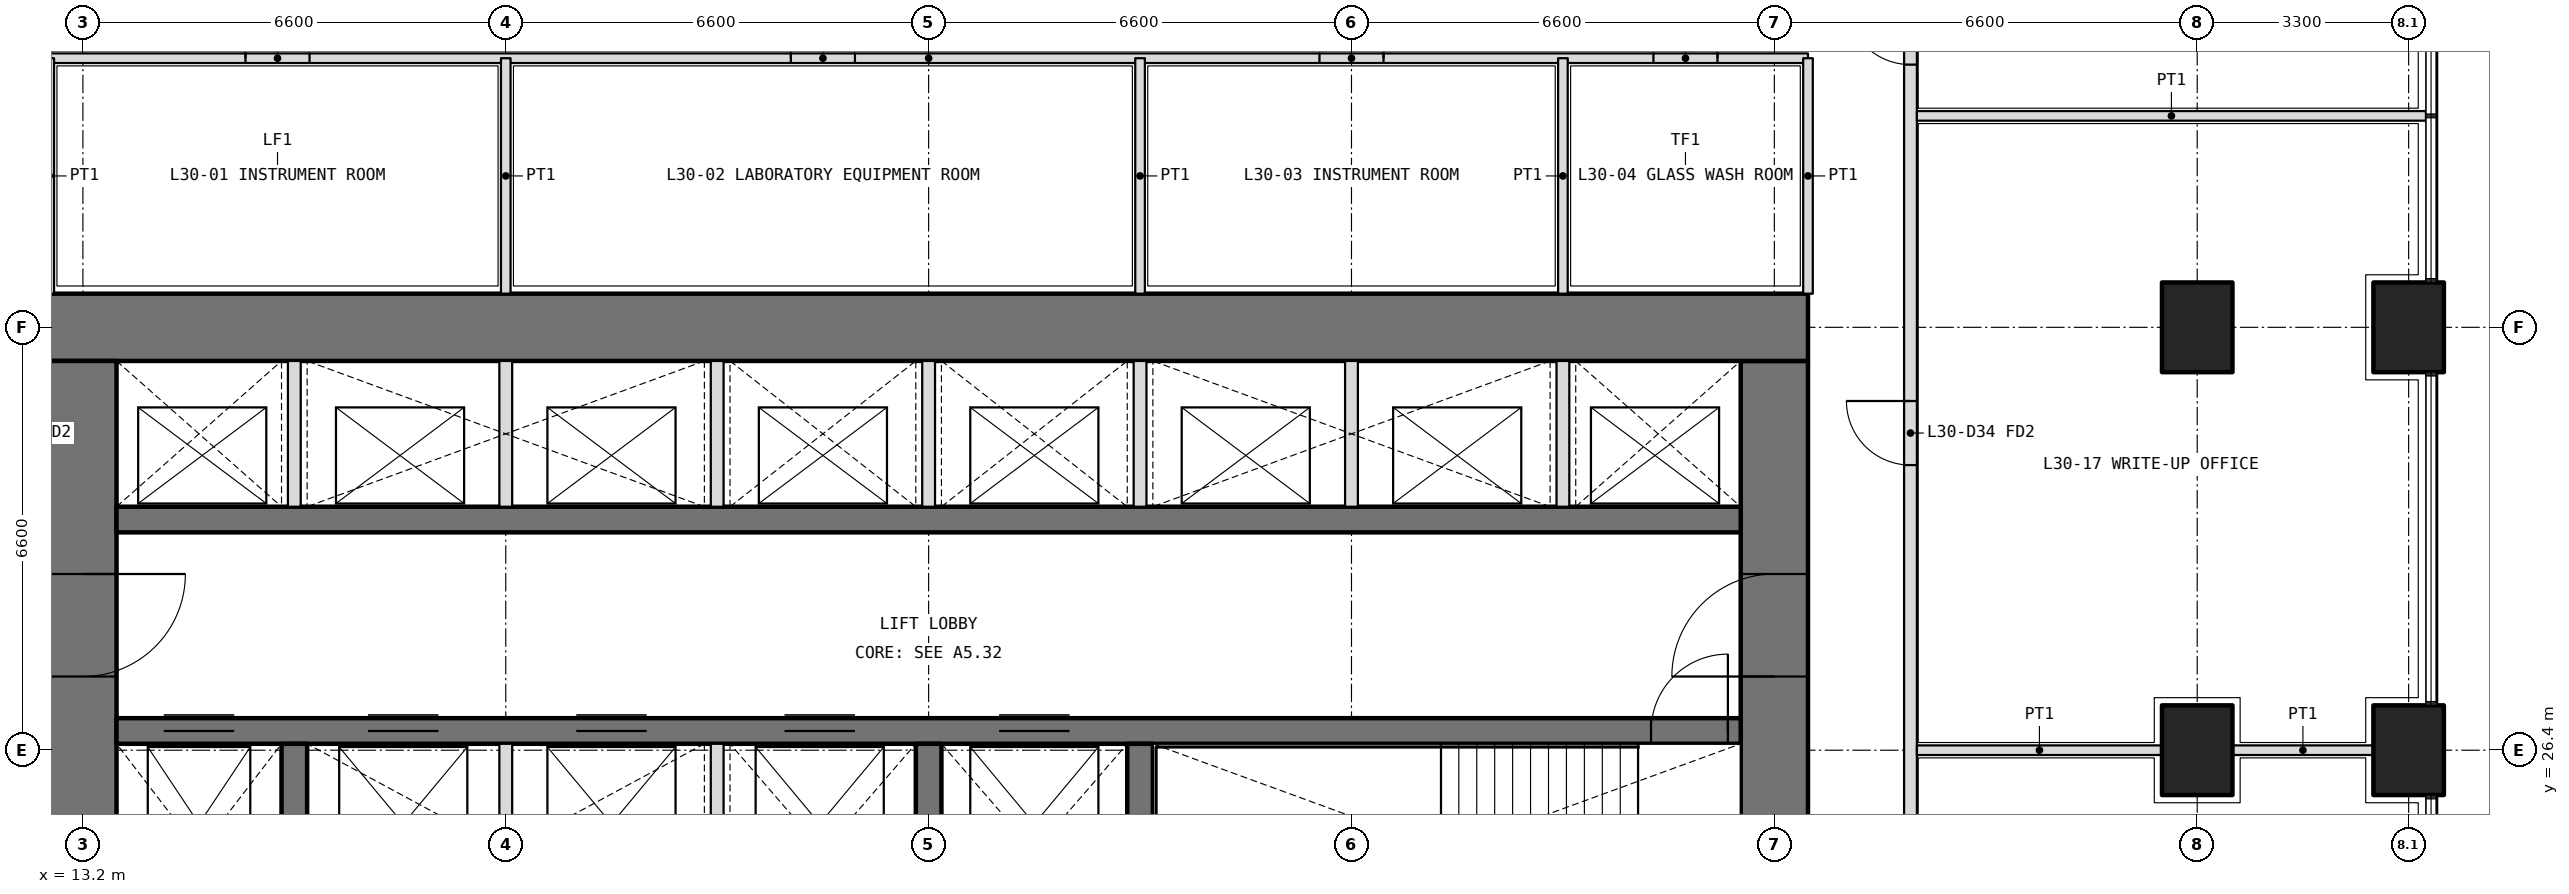
"""IFC4 building model, lengths in metres.
Left out: names, types, materials, properties, quantities, classifications, styles, units other than length and angle.
Written with IfcOpenShell. Run it as: python <this file> out.ifc"""

import sys

from ifc_helpers import new_model, si_unit, direction, frame, frame_2d, origin, origin_2d, place, context, subcontext, project, spatial, rectangle, extrude, element, fill, save


model = new_model("IFC4")
c1 = context("Model", 3, precision=1e-05, world=origin(), true_north=direction((0.0, 1.0)))
c2 = subcontext(c1, "Body", "Model", "MODEL_VIEW")
j1 = project(units=[si_unit("LENGTHUNIT", "METRE"), si_unit("PLANEANGLEUNIT", "RADIAN")], contexts=[c1])
p1 = place(None, origin())
s1 = spatial("IfcSite", under=j1, at=p1, CompositionType="ELEMENT")
p2 = place(p1, origin())
s2 = spatial("IfcBuilding", under=s1, at=p2, CompositionType="ELEMENT")
p3 = place(p2, frame((0.0, 0.0, 132.6)))
s3 = spatial("IfcBuildingStorey", under=s2, at=p3, CompositionType="ELEMENT", Elevation=132.6)
for number, where, z_axis, x_axis in (
    (1, (49.5, 26.4, 0.0), (0.0, 0.0, 1.0), (0.0, 1.0, 0.0)),
    (2, (49.5, 33.0, 0.0), (0.0, 0.0, 1.0), (0.0, 1.0, 0.0)),
    (3, (46.2, 26.4, 0.0), (0.0, 0.0, 1.0), (0.0, 1.0, 0.0)),
    (4, (46.2, 33.0, 0.0), (0.0, 0.0, 1.0), (0.0, 1.0, 0.0)),
):
    element("IfcColumn", number, at=place(p3, frame(where, z_axis=z_axis, x_axis=x_axis)), inside=s3, PredefinedType="COLUMN", context=c2, shape_type="SweptSolid", body=[
        extrude(rectangle(XDim=1.4, YDim=1.1, at=origin_2d()), origin(), (0.0, 0.0, 1.0), 4.2),
    ])
p4 = place(p3, frame((39.6, 13.725, 0.0), z_axis=(0.0, 0.0, 1.0), x_axis=(0.0, 1.0, 0.0)))
e5 = element("IfcWall", 5, at=p4, inside=s3, PredefinedType="SHEAR", context=c2, shape_type="SweptSolid", body=[
    extrude(rectangle(XDim=18.75, YDim=1.05, at=frame_2d((9.375, 0.0))), origin(), (0.0, 0.0, 1.0), 4.2),
])
p5 = place(p4, frame((3.025, 0.0, 0.0)))
e6 = element("IfcOpeningElement", 6, at=p5, cuts=e5, PredefinedType="OPENING", context=c2, shape_type="SweptSolid", body=[
    extrude(rectangle(XDim=1.6, YDim=2.1, at=frame_2d((0.8, 1.05))), frame((0.0, 0.535, 0.0), z_axis=(0.0, -1.0, 0.0), x_axis=(1.0, 0.0, 0.0)), (0.0, 0.0, 1.0), 1.07),
])
p6 = place(p4, frame((13.825, 0.0, 0.0)))
e7 = element("IfcOpeningElement", 7, at=p6, cuts=e5, PredefinedType="OPENING", context=c2, shape_type="SweptSolid", body=[
    extrude(rectangle(XDim=1.6, YDim=2.1, at=frame_2d((0.8, 1.05))), frame((0.0, 0.535, 0.0), z_axis=(0.0, -1.0, 0.0), x_axis=(1.0, 0.0, 0.0)), (0.0, 0.0, 1.0), 1.07),
])
p7 = place(p3, frame((40.125, 33.0, 0.0), z_axis=(0.0, 0.0, 1.0), x_axis=(-1.0, 0.0, 0.0)))
e8 = element("IfcWall", 8, at=p7, inside=s3, PredefinedType="SHEAR", context=c2, shape_type="SweptSolid", body=[
    extrude(rectangle(XDim=27.45, YDim=1.05, at=frame_2d((13.725, 0.0))), origin(), (0.0, 0.0, 1.0), 4.2),
])
p8 = place(p3, frame((13.2, 32.475, 0.0), z_axis=(0.0, 0.0, 1.0), x_axis=(0.0, -1.0, 0.0)))
e9 = element("IfcWall", 9, at=p8, inside=s3, PredefinedType="SHEAR", context=c2, shape_type="SweptSolid", body=[
    extrude(rectangle(XDim=18.75, YDim=1.05, at=frame_2d((9.375, 0.0))), origin(), (0.0, 0.0, 1.0), 4.2),
])
p9 = place(p8, frame((14.125, 0.0, 0.0)))
e10 = element("IfcOpeningElement", 10, at=p9, cuts=e9, PredefinedType="OPENING", context=c2, shape_type="SweptSolid", body=[
    extrude(rectangle(XDim=1.6, YDim=2.1, at=frame_2d((0.8, 1.05))), frame((0.0, 0.535, 0.0), z_axis=(0.0, -1.0, 0.0), x_axis=(1.0, 0.0, 0.0)), (0.0, 0.0, 1.0), 1.07),
])
p10 = place(p8, frame((3.325, 0.0, 0.0)))
e11 = element("IfcOpeningElement", 11, at=p10, cuts=e9, PredefinedType="OPENING", context=c2, shape_type="SweptSolid", body=[
    extrude(rectangle(XDim=1.6, YDim=2.1, at=frame_2d((0.8, 1.05))), frame((0.0, 0.535, 0.0), z_axis=(0.0, -1.0, 0.0), x_axis=(1.0, 0.0, 0.0)), (0.0, 0.0, 1.0), 1.07),
])
p11 = place(p3, frame((13.725, 26.7, 0.0), z_axis=(0.0, 0.0, 1.0), x_axis=(1.0, 0.0, 0.0)))
e12 = element("IfcWall", 12, at=p11, inside=s3, PredefinedType="SHEAR", context=c2, shape_type="SweptSolid", body=[
    extrude(rectangle(XDim=25.35, YDim=0.4, at=frame_2d((12.675, 0.0))), origin(), (0.0, 0.0, 1.0), 4.2),
])
p12 = place(p11, frame((23.95, 0.0, 0.0)))
e13 = element("IfcOpeningElement", 13, at=p12, cuts=e12, PredefinedType="OPENING", context=c2, shape_type="SweptSolid", body=[
    extrude(rectangle(XDim=1.2, YDim=2.1, at=frame_2d((0.6, 1.05))), frame((0.0, 0.21, 0.0), z_axis=(0.0, -1.0, 0.0), x_axis=(1.0, 0.0, 0.0)), (0.0, 0.0, 1.0), 0.42),
])
p13 = place(p11, frame((0.738, 0.0, 0.0)))
e14 = element("IfcOpeningElement", 14, at=p13, cuts=e12, PredefinedType="OPENING", context=c2, shape_type="SweptSolid", body=[
    extrude(rectangle(XDim=1.1, YDim=2.1, at=frame_2d((0.55, 1.05))), frame((0.0, 0.21, 0.0), z_axis=(0.0, -1.0, 0.0), x_axis=(1.0, 0.0, 0.0)), (0.0, 0.0, 1.0), 0.42),
])
p14 = place(p11, frame((3.925, 0.0, 0.0)))
e15 = element("IfcOpeningElement", 15, at=p14, cuts=e12, PredefinedType="OPENING", context=c2, shape_type="SweptSolid", body=[
    extrude(rectangle(XDim=1.1, YDim=2.1, at=frame_2d((0.55, 1.05))), frame((0.0, 0.21, 0.0), z_axis=(0.0, -1.0, 0.0), x_axis=(1.0, 0.0, 0.0)), (0.0, 0.0, 1.0), 0.42),
])
p15 = place(p11, frame((7.175, 0.0, 0.0)))
e16 = element("IfcOpeningElement", 16, at=p15, cuts=e12, PredefinedType="OPENING", context=c2, shape_type="SweptSolid", body=[
    extrude(rectangle(XDim=1.1, YDim=2.1, at=frame_2d((0.55, 1.05))), frame((0.0, 0.21, 0.0), z_axis=(0.0, -1.0, 0.0), x_axis=(1.0, 0.0, 0.0)), (0.0, 0.0, 1.0), 0.42),
])
p16 = place(p11, frame((10.425, 0.0, 0.0)))
e17 = element("IfcOpeningElement", 17, at=p16, cuts=e12, PredefinedType="OPENING", context=c2, shape_type="SweptSolid", body=[
    extrude(rectangle(XDim=1.1, YDim=2.1, at=frame_2d((0.55, 1.05))), frame((0.0, 0.21, 0.0), z_axis=(0.0, -1.0, 0.0), x_axis=(1.0, 0.0, 0.0)), (0.0, 0.0, 1.0), 0.42),
])
p17 = place(p11, frame((13.775, 0.0, 0.0)))
e18 = element("IfcOpeningElement", 18, at=p17, cuts=e12, PredefinedType="OPENING", context=c2, shape_type="SweptSolid", body=[
    extrude(rectangle(XDim=1.1, YDim=2.1, at=frame_2d((0.55, 1.05))), frame((0.0, 0.21, 0.0), z_axis=(0.0, -1.0, 0.0), x_axis=(1.0, 0.0, 0.0)), (0.0, 0.0, 1.0), 0.42),
])
p18 = place(p3, frame((13.725, 30.0, 0.0), z_axis=(0.0, 0.0, 1.0), x_axis=(1.0, 0.0, 0.0)))
e19 = element("IfcWall", 19, at=p18, inside=s3, PredefinedType="SHEAR", context=c2, shape_type="SweptSolid", body=[
    extrude(rectangle(XDim=25.35, YDim=0.4, at=frame_2d((12.675, 0.0))), origin(), (0.0, 0.0, 1.0), 4.2),
])
for number, where, z_axis, x_axis in (
    (20, (16.5, 23.15, 0.0), (0.0, 0.0, 1.0), (0.0, 1.0, 0.0)),
    (21, (26.4, 23.15, 0.0), (0.0, 0.0, 1.0), (0.0, 1.0, 0.0)),
    (22, (29.7, 23.15, 0.0), (0.0, 0.0, 1.0), (0.0, 1.0, 0.0)),
):
    element("IfcWall", number, at=place(p3, frame(where, z_axis=z_axis, x_axis=x_axis)), inside=s3, PredefinedType="SHEAR", context=c2, shape_type="SweptSolid", body=[
        extrude(rectangle(XDim=3.35, YDim=0.4, at=frame_2d((1.675, 0.0))), origin(), (0.0, 0.0, 1.0), 4.2),
    ])
for number, where, z_axis, x_axis in (
    (23, (16.5, 30.2, 0.0), (0.0, 0.0, 1.0), (0.0, 1.0, 0.0)),
    (24, (19.8, 30.2, 0.0), (0.0, 0.0, 1.0), (0.0, 1.0, 0.0)),
    (25, (23.1, 30.2, 0.0), (0.0, 0.0, 1.0), (0.0, 1.0, 0.0)),
    (26, (26.4, 30.2, 0.0), (0.0, 0.0, 1.0), (0.0, 1.0, 0.0)),
    (27, (29.7, 30.2, 0.0), (0.0, 0.0, 1.0), (0.0, 1.0, 0.0)),
    (28, (33.0, 30.2, 0.0), (0.0, 0.0, 1.0), (0.0, 1.0, 0.0)),
    (29, (36.3, 30.2, 0.0), (0.0, 0.0, 1.0), (0.0, 1.0, 0.0)),
):
    element("IfcWall", number, at=place(p3, frame(where, z_axis=z_axis, x_axis=x_axis)), inside=s3, PredefinedType="PARTITIONING", context=c2, shape_type="SweptSolid", body=[
        extrude(rectangle(XDim=2.275, YDim=0.2, at=frame_2d((1.138, 0.0))), origin(), (0.0, 0.0, 1.0), 4.2),
    ])
for number, where, z_axis, x_axis in (
    (30, (19.8, 23.15, 0.0), (0.0, 0.0, 1.0), (0.0, 1.0, 0.0)),
    (31, (23.1, 23.15, 0.0), (0.0, 0.0, 1.0), (0.0, 1.0, 0.0)),
):
    element("IfcWall", number, at=place(p3, frame(where, z_axis=z_axis, x_axis=x_axis)), inside=s3, PredefinedType="PARTITIONING", context=c2, shape_type="SweptSolid", body=[
        extrude(rectangle(XDim=3.35, YDim=0.2, at=frame_2d((1.675, 0.0))), origin(), (0.0, 0.0, 1.0), 4.2),
    ])
p19 = place(p3, frame((12.675, 37.2, 0.0), z_axis=(0.0, 0.0, 1.0), x_axis=(1.0, 0.0, 0.0)))
e32 = element("IfcWall", 32, at=p19, inside=s3, PredefinedType="PARTITIONING", context=c2, shape_type="SweptSolid", body=[
    extrude(rectangle(XDim=27.45, YDim=0.15, at=frame_2d((13.725, 0.0))), origin(), (0.0, 0.0, 1.0), 2.85),
])
p20 = place(p19, frame((3.062, 0.0, 0.0)))
e33 = element("IfcOpeningElement", 33, at=p20, cuts=e32, PredefinedType="OPENING", context=c2, shape_type="SweptSolid", body=[
    extrude(rectangle(XDim=1.0, YDim=2.1, at=frame_2d((0.5, 1.05))), frame((0.0, 0.085, 0.0), z_axis=(0.0, -1.0, 0.0), x_axis=(1.0, 0.0, 0.0)), (0.0, 0.0, 1.0), 0.17),
])
p21 = place(p19, frame((11.575, 0.0, 0.0)))
e34 = element("IfcOpeningElement", 34, at=p21, cuts=e32, PredefinedType="OPENING", context=c2, shape_type="SweptSolid", body=[
    extrude(rectangle(XDim=1.0, YDim=2.1, at=frame_2d((0.5, 1.05))), frame((0.0, 0.085, 0.0), z_axis=(0.0, -1.0, 0.0), x_axis=(1.0, 0.0, 0.0)), (0.0, 0.0, 1.0), 0.17),
])
p22 = place(p19, frame((19.825, 0.0, 0.0)))
e35 = element("IfcOpeningElement", 35, at=p22, cuts=e32, PredefinedType="OPENING", context=c2, shape_type="SweptSolid", body=[
    extrude(rectangle(XDim=1.0, YDim=2.1, at=frame_2d((0.5, 1.05))), frame((0.0, 0.085, 0.0), z_axis=(0.0, -1.0, 0.0), x_axis=(1.0, 0.0, 0.0)), (0.0, 0.0, 1.0), 0.17),
])
p23 = place(p19, frame((25.038, 0.0, 0.0)))
e36 = element("IfcOpeningElement", 36, at=p23, cuts=e32, PredefinedType="OPENING", context=c2, shape_type="SweptSolid", body=[
    extrude(rectangle(XDim=1.0, YDim=2.1, at=frame_2d((0.5, 1.05))), frame((0.0, 0.085, 0.0), z_axis=(0.0, -1.0, 0.0), x_axis=(1.0, 0.0, 0.0)), (0.0, 0.0, 1.0), 0.17),
])
for number, where, z_axis, x_axis in (
    (37, (12.675, 33.525, 0.0), (0.0, 0.0, 1.0), (0.0, 1.0, 0.0)),
    (38, (40.125, 33.525, 0.0), (0.0, 0.0, 1.0), (0.0, 1.0, 0.0)),
    (39, (19.8, 33.525, 0.0), (0.0, 0.0, 1.0), (0.0, 1.0, 0.0)),
):
    element("IfcWall", number, at=place(p3, frame(where, z_axis=z_axis, x_axis=x_axis)), inside=s3, PredefinedType="PARTITIONING", context=c2, shape_type="SweptSolid", body=[
        extrude(rectangle(XDim=3.675, YDim=0.15, at=frame_2d((1.837, 0.0))), origin(), (0.0, 0.0, 1.0), 2.85),
    ])
for number, where, z_axis, x_axis in (
    (40, (29.7, 33.525, 0.0), (0.0, 0.0, 1.0), (0.0, 1.0, 0.0)),
    (41, (36.3, 33.525, 0.0), (0.0, 0.0, 1.0), (0.0, 1.0, 0.0)),
):
    element("IfcWall", number, at=place(p3, frame(where, z_axis=z_axis, x_axis=x_axis)), inside=s3, PredefinedType="PARTITIONING", context=c2, shape_type="SweptSolid", body=[
        extrude(rectangle(XDim=3.675, YDim=0.15, at=frame_2d((1.837, 0.0))), origin(), (0.0, 0.0, 1.0), 3.9),
    ])
p24 = place(p3, frame((41.725, 11.175, 0.0), z_axis=(0.0, 0.0, 1.0), x_axis=(0.0, 1.0, 0.0)))
e42 = element("IfcWall", 42, at=p24, inside=s3, PredefinedType="PARTITIONING", context=c2, shape_type="SweptSolid", body=[
    extrude(rectangle(XDim=27.625, YDim=0.2, at=frame_2d((13.812, 0.0))), origin(), (0.0, 0.0, 1.0), 2.85),
])
p25 = place(p24, frame((3.762, 0.0, 0.0)))
e43 = element("IfcOpeningElement", 43, at=p25, cuts=e42, PredefinedType="OPENING", context=c2, shape_type="SweptSolid", body=[
    extrude(rectangle(XDim=1.0, YDim=2.1, at=frame_2d((0.5, 1.05))), frame((0.0, 0.11, 0.0), z_axis=(0.0, -1.0, 0.0), x_axis=(1.0, 0.0, 0.0)), (0.0, 0.0, 1.0), 0.22),
])
p26 = place(p24, frame((9.625, 0.0, 0.0)))
e44 = element("IfcOpeningElement", 44, at=p26, cuts=e42, PredefinedType="OPENING", context=c2, shape_type="SweptSolid", body=[
    extrude(rectangle(XDim=1.0, YDim=2.1, at=frame_2d((0.5, 1.05))), frame((0.0, 0.11, 0.0), z_axis=(0.0, -1.0, 0.0), x_axis=(1.0, 0.0, 0.0)), (0.0, 0.0, 1.0), 0.22),
])
p27 = place(p24, frame((12.975, 0.0, 0.0)))
e45 = element("IfcOpeningElement", 45, at=p27, cuts=e42, PredefinedType="OPENING", context=c2, shape_type="SweptSolid", body=[
    extrude(rectangle(XDim=0.9, YDim=2.1, at=frame_2d((0.45, 1.05))), frame((0.0, 0.11, 0.0), z_axis=(0.0, -1.0, 0.0), x_axis=(1.0, 0.0, 0.0)), (0.0, 0.0, 1.0), 0.22),
])
p28 = place(p24, frame((19.675, 0.0, 0.0)))
e46 = element("IfcOpeningElement", 46, at=p28, cuts=e42, PredefinedType="OPENING", context=c2, shape_type="SweptSolid", body=[
    extrude(rectangle(XDim=1.0, YDim=2.1, at=frame_2d((0.5, 1.05))), frame((0.0, 0.11, 0.0), z_axis=(0.0, -1.0, 0.0), x_axis=(1.0, 0.0, 0.0)), (0.0, 0.0, 1.0), 0.22),
])
p29 = place(p24, frame((25.925, 0.0, 0.0)))
e47 = element("IfcOpeningElement", 47, at=p29, cuts=e42, PredefinedType="OPENING", context=c2, shape_type="SweptSolid", body=[
    extrude(rectangle(XDim=1.0, YDim=2.1, at=frame_2d((0.5, 1.05))), frame((0.0, 0.11, 0.0), z_axis=(0.0, -1.0, 0.0), x_axis=(1.0, 0.0, 0.0)), (0.0, 0.0, 1.0), 0.22),
])
p30 = place(p3, frame((48.95, 26.4, 0.0), z_axis=(0.0, 0.0, 1.0), x_axis=(-1.0, 0.0, 0.0)))
e48 = element("IfcWall", 48, at=p30, inside=s3, PredefinedType="PARTITIONING", context=c2, shape_type="SweptSolid", body=[
    extrude(rectangle(XDim=2.2, YDim=0.15, at=frame_2d((1.1, 0.0))), origin(), (0.0, 0.0, 1.0), 2.85),
])
p31 = place(p3, frame((45.65, 26.4, 0.0), z_axis=(0.0, 0.0, 1.0), x_axis=(-1.0, 0.0, 0.0)))
e49 = element("IfcWall", 49, at=p31, inside=s3, PredefinedType="PARTITIONING", context=c2, shape_type="SweptSolid", body=[
    extrude(rectangle(XDim=3.825, YDim=0.15, at=frame_2d((1.913, 0.0))), origin(), (0.0, 0.0, 1.0), 2.85),
])
p32 = place(p3, frame((49.77, 36.3, 0.0), z_axis=(0.0, 0.0, 1.0), x_axis=(-1.0, 0.0, 0.0)))
e50 = element("IfcWall", 50, at=p32, inside=s3, PredefinedType="PARTITIONING", context=c2, shape_type="SweptSolid", body=[
    extrude(rectangle(XDim=7.945, YDim=0.15, at=frame_2d((3.973, 0.0))), origin(), (0.0, 0.0, 1.0), 2.7),
])
p33 = place(p20, origin())
e51 = element("IfcDoor", 51, at=p33, inside=s3, OperationType="SINGLE_SWING_LEFT", PredefinedType="DOOR", context=c2, shape_type="SweptSolid", body=[
    extrude(rectangle(XDim=1.0, YDim=2.1, at=frame_2d((0.5, 1.05))), frame((0.0, 0.025, 0.0), z_axis=(0.0, -1.0, 0.0), x_axis=(1.0, 0.0, 0.0)), (0.0, 0.0, 1.0), 0.05),
])
fill(e33, e51)
p34 = place(p21, origin())
e52 = element("IfcDoor", 52, at=p34, inside=s3, OperationType="SINGLE_SWING_LEFT", PredefinedType="DOOR", context=c2, shape_type="SweptSolid", body=[
    extrude(rectangle(XDim=1.0, YDim=2.1, at=frame_2d((0.5, 1.05))), frame((0.0, 0.025, 0.0), z_axis=(0.0, -1.0, 0.0), x_axis=(1.0, 0.0, 0.0)), (0.0, 0.0, 1.0), 0.05),
])
fill(e34, e52)
p35 = place(p22, origin())
e53 = element("IfcDoor", 53, at=p35, inside=s3, OperationType="SINGLE_SWING_RIGHT", PredefinedType="DOOR", context=c2, shape_type="SweptSolid", body=[
    extrude(rectangle(XDim=1.0, YDim=2.1, at=frame_2d((0.5, 1.05))), frame((0.0, 0.025, 0.0), z_axis=(0.0, -1.0, 0.0), x_axis=(1.0, 0.0, 0.0)), (0.0, 0.0, 1.0), 0.05),
])
fill(e35, e53)
p36 = place(p23, origin())
e54 = element("IfcDoor", 54, at=p36, inside=s3, OperationType="SINGLE_SWING_RIGHT", PredefinedType="DOOR", context=c2, shape_type="SweptSolid", body=[
    extrude(rectangle(XDim=1.0, YDim=2.1, at=frame_2d((0.5, 1.05))), frame((0.0, 0.025, 0.0), z_axis=(0.0, -1.0, 0.0), x_axis=(1.0, 0.0, 0.0)), (0.0, 0.0, 1.0), 0.05),
])
fill(e36, e54)
p37 = place(p28, origin())
e55 = element("IfcDoor", 55, at=p37, inside=s3, OperationType="SINGLE_SWING_RIGHT", PredefinedType="DOOR", context=c2, shape_type="SweptSolid", body=[
    extrude(rectangle(XDim=1.0, YDim=2.1, at=frame_2d((0.5, 1.05))), frame((0.0, 0.025, 0.0), z_axis=(0.0, -1.0, 0.0), x_axis=(1.0, 0.0, 0.0)), (0.0, 0.0, 1.0), 0.05),
])
fill(e46, e55)
p38 = place(p29, origin())
e56 = element("IfcDoor", 56, at=p38, inside=s3, OperationType="SINGLE_SWING_RIGHT", PredefinedType="DOOR", context=c2, shape_type="SweptSolid", body=[
    extrude(rectangle(XDim=1.0, YDim=2.1, at=frame_2d((0.5, 1.05))), frame((0.0, 0.025, 0.0), z_axis=(0.0, -1.0, 0.0), x_axis=(1.0, 0.0, 0.0)), (0.0, 0.0, 1.0), 0.05),
])
fill(e47, e56)
p39 = place(p12, origin())
e57 = element("IfcDoor", 57, at=p39, inside=s3, OperationType="SINGLE_SWING_RIGHT", PredefinedType="DOOR", context=c2, shape_type="SweptSolid", body=[
    extrude(rectangle(XDim=1.2, YDim=2.1, at=frame_2d((0.6, 1.05))), frame((0.0, 0.025, 0.0), z_axis=(0.0, -1.0, 0.0), x_axis=(1.0, 0.0, 0.0)), (0.0, 0.0, 1.0), 0.05),
])
fill(e13, e57)
p40 = place(p10, origin())
e58 = element("IfcDoor", 58, at=p40, inside=s3, OperationType="DOUBLE_DOOR_DOUBLE_SWING", PredefinedType="DOOR", context=c2, shape_type="SweptSolid", body=[
    extrude(rectangle(XDim=1.6, YDim=2.1, at=frame_2d((0.8, 1.05))), frame((0.0, 0.025, 0.0), z_axis=(0.0, -1.0, 0.0), x_axis=(1.0, 0.0, 0.0)), (0.0, 0.0, 1.0), 0.05),
])
fill(e11, e58)
p41 = place(p6, origin())
e59 = element("IfcDoor", 59, at=p41, inside=s3, OperationType="DOUBLE_DOOR_DOUBLE_SWING", PredefinedType="DOOR", context=c2, shape_type="SweptSolid", body=[
    extrude(rectangle(XDim=1.6, YDim=2.1, at=frame_2d((0.8, 1.05))), frame((0.0, 0.025, 0.0), z_axis=(0.0, -1.0, 0.0), x_axis=(1.0, 0.0, 0.0)), (0.0, 0.0, 1.0), 0.05),
])
fill(e7, e59)
p42 = place(p13, origin())
e60 = element("IfcDoor", 60, at=p42, inside=s3, OperationType="DOUBLE_DOOR_SLIDING", PredefinedType="DOOR", context=c2, shape_type="SweptSolid", body=[
    extrude(rectangle(XDim=1.1, YDim=2.1, at=frame_2d((0.55, 1.05))), frame((0.0, 0.025, 0.0), z_axis=(0.0, -1.0, 0.0), x_axis=(1.0, 0.0, 0.0)), (0.0, 0.0, 1.0), 0.05),
])
fill(e14, e60)
p43 = place(p14, origin())
e61 = element("IfcDoor", 61, at=p43, inside=s3, OperationType="DOUBLE_DOOR_SLIDING", PredefinedType="DOOR", context=c2, shape_type="SweptSolid", body=[
    extrude(rectangle(XDim=1.1, YDim=2.1, at=frame_2d((0.55, 1.05))), frame((0.0, 0.025, 0.0), z_axis=(0.0, -1.0, 0.0), x_axis=(1.0, 0.0, 0.0)), (0.0, 0.0, 1.0), 0.05),
])
fill(e15, e61)
p44 = place(p15, origin())
e62 = element("IfcDoor", 62, at=p44, inside=s3, OperationType="DOUBLE_DOOR_SLIDING", PredefinedType="DOOR", context=c2, shape_type="SweptSolid", body=[
    extrude(rectangle(XDim=1.1, YDim=2.1, at=frame_2d((0.55, 1.05))), frame((0.0, 0.025, 0.0), z_axis=(0.0, -1.0, 0.0), x_axis=(1.0, 0.0, 0.0)), (0.0, 0.0, 1.0), 0.05),
])
fill(e16, e62)
p45 = place(p16, origin())
e63 = element("IfcDoor", 63, at=p45, inside=s3, OperationType="DOUBLE_DOOR_SLIDING", PredefinedType="DOOR", context=c2, shape_type="SweptSolid", body=[
    extrude(rectangle(XDim=1.1, YDim=2.1, at=frame_2d((0.55, 1.05))), frame((0.0, 0.025, 0.0), z_axis=(0.0, -1.0, 0.0), x_axis=(1.0, 0.0, 0.0)), (0.0, 0.0, 1.0), 0.05),
])
fill(e17, e63)
p46 = place(p17, origin())
e64 = element("IfcDoor", 64, at=p46, inside=s3, OperationType="DOUBLE_DOOR_SLIDING", PredefinedType="DOOR", context=c2, shape_type="SweptSolid", body=[
    extrude(rectangle(XDim=1.1, YDim=2.1, at=frame_2d((0.55, 1.05))), frame((0.0, 0.025, 0.0), z_axis=(0.0, -1.0, 0.0), x_axis=(1.0, 0.0, 0.0)), (0.0, 0.0, 1.0), 0.05),
])
fill(e18, e64)
save(model, sys.argv[1])
